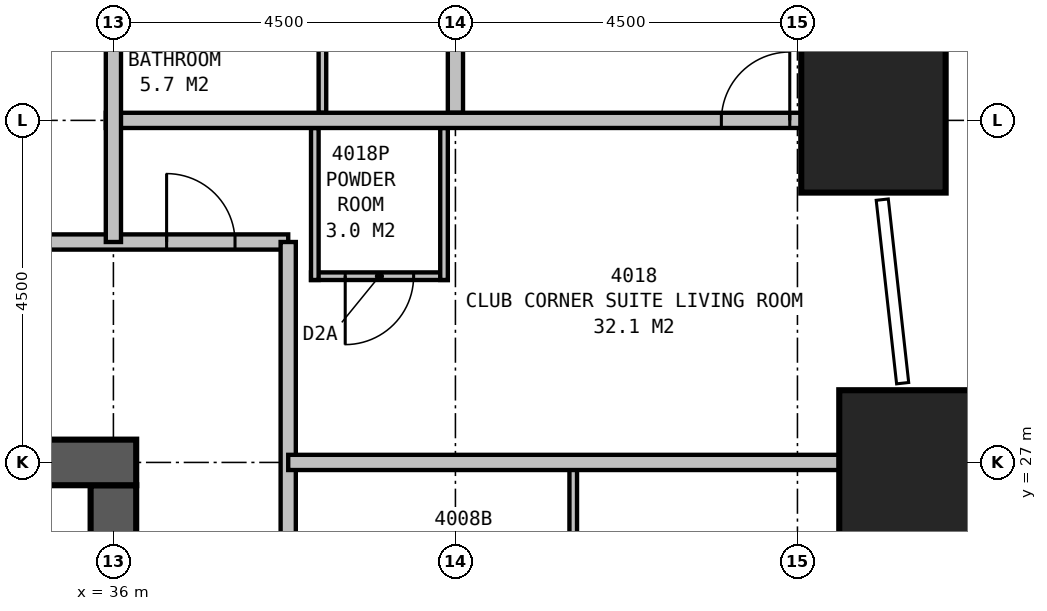
"""IFC4 building model, lengths in metres.
Left out: names, types, materials, properties, quantities, classifications, styles, units other than length and angle.
Written with IfcOpenShell. Run it as: python <this file> out.ifc"""

import sys

from ifc_helpers import new_model, si_unit, direction, frame, frame_2d, origin, origin_2d, place, context, subcontext, project, spatial, rectangle, extrude, element, fill, save


model = new_model("IFC4")
c1 = context("Model", 3, precision=1e-05, world=origin(), true_north=direction((0.0, 1.0)))
c2 = subcontext(c1, "Body", "Model", "MODEL_VIEW")
j1 = project(units=[si_unit("LENGTHUNIT", "METRE"), si_unit("PLANEANGLEUNIT", "RADIAN")], contexts=[c1])
p1 = place(None, origin())
s1 = spatial("IfcSite", under=j1, at=p1, CompositionType="ELEMENT")
p2 = place(p1, origin())
s2 = spatial("IfcBuilding", under=s1, at=p2, CompositionType="ELEMENT")
p3 = place(p2, frame((0.0, 0.0, 157.9)))
s3 = spatial("IfcBuildingStorey", under=s2, at=p3, CompositionType="ELEMENT", Elevation=157.9)
for number, where, z_axis, x_axis in (
    (1, (46.5, 27.0, 0.0), (0.0, 0.0, 1.0), (1.0, 0.0, 0.0)),
    (2, (46.0, 31.5, 0.0), (0.0, 0.0, 1.0), (1.0, 0.0, 0.0)),
):
    element("IfcColumn", number, at=place(p3, frame(where, z_axis=z_axis, x_axis=x_axis)), inside=s3, PredefinedType="COLUMN", context=c2, shape_type="SweptSolid", body=[
        extrude(rectangle(XDim=1.9, YDim=1.9, at=origin_2d()), origin(), (0.0, 0.0, 1.0), 4.5),
    ])
p4 = place(p3, frame((36.3, 27.0, 0.0), z_axis=(0.0, 0.0, 1.0), x_axis=(-1.0, 0.0, 0.0)))
e3 = element("IfcWall", 3, at=p4, inside=s3, PredefinedType="SHEAR", context=c2, shape_type="SweptSolid", body=[
    extrude(rectangle(XDim=23.1, YDim=0.6, at=frame_2d((11.55, 0.0))), origin(), (0.0, 0.0, 1.0), 4.5),
])
p5 = place(p4, frame((17.05, 0.0, 0.0)))
e4 = element("IfcOpeningElement", 4, at=p5, cuts=e3, PredefinedType="OPENING", context=c2, shape_type="SweptSolid", body=[
    extrude(rectangle(XDim=1.0, YDim=2.1, at=frame_2d((0.5, 1.05))), frame((0.0, 0.31, 0.0), z_axis=(0.0, -1.0, 0.0), x_axis=(1.0, 0.0, 0.0)), (0.0, 0.0, 1.0), 0.62),
])
p6 = place(p4, frame((12.05, 0.0, 0.0)))
e5 = element("IfcOpeningElement", 5, at=p6, cuts=e3, PredefinedType="OPENING", context=c2, shape_type="SweptSolid", body=[
    extrude(rectangle(XDim=1.0, YDim=2.1, at=frame_2d((0.5, 1.05))), frame((0.0, 0.31, 0.0), z_axis=(0.0, -1.0, 0.0), x_axis=(1.0, 0.0, 0.0)), (0.0, 0.0, 1.0), 0.62),
])
p7 = place(p4, frame((7.05, 0.0, 0.0)))
e6 = element("IfcOpeningElement", 6, at=p7, cuts=e3, PredefinedType="OPENING", context=c2, shape_type="SweptSolid", body=[
    extrude(rectangle(XDim=1.0, YDim=2.1, at=frame_2d((0.5, 1.05))), frame((0.0, 0.31, 0.0), z_axis=(0.0, -1.0, 0.0), x_axis=(1.0, 0.0, 0.0)), (0.0, 0.0, 1.0), 0.62),
])
p8 = place(p3, frame((36.0, 20.0, 0.0), z_axis=(0.0, 0.0, 1.0), x_axis=(0.0, 1.0, 0.0)))
e7 = element("IfcWall", 7, at=p8, inside=s3, PredefinedType="SHEAR", context=c2, shape_type="SweptSolid", body=[
    extrude(rectangle(XDim=6.7, YDim=0.6, at=frame_2d((3.35, 0.0))), origin(), (0.0, 0.0, 1.0), 4.5),
])
p9 = place(p3, frame((11.2, 29.9, 0.0), z_axis=(0.0, 0.0, 1.0), x_axis=(1.0, 0.0, 0.0)))
e8 = element("IfcWall", 8, at=p9, inside=s3, PredefinedType="PARTITIONING", context=c2, shape_type="SweptSolid", body=[
    extrude(rectangle(XDim=27.1, YDim=0.2, at=frame_2d((13.55, 0.0))), origin(), (0.0, 0.0, 1.0), 4.25),
])
p10 = place(p9, frame((6.45, 0.0, 0.0), z_axis=(0.0, 0.0, 1.0), x_axis=(-1.0, 0.0, 0.0)))
e9 = element("IfcOpeningElement", 9, at=p10, cuts=e8, PredefinedType="OPENING", context=c2, shape_type="SweptSolid", body=[
    extrude(rectangle(XDim=1.0, YDim=2.1, at=frame_2d((0.5, 1.05))), frame((0.0, 0.11, 0.0), z_axis=(0.0, -1.0, 0.0), x_axis=(1.0, 0.0, 0.0)), (0.0, 0.0, 1.0), 0.22),
])
p11 = place(p9, frame((25.5, 0.0, 0.0)))
e10 = element("IfcOpeningElement", 10, at=p11, cuts=e8, PredefinedType="OPENING", context=c2, shape_type="SweptSolid", body=[
    extrude(rectangle(XDim=0.9, YDim=2.1, at=frame_2d((0.45, 1.05))), frame((0.0, 0.11, 0.0), z_axis=(0.0, -1.0, 0.0), x_axis=(1.0, 0.0, 0.0)), (0.0, 0.0, 1.0), 0.22),
])
p12 = place(p9, frame((0.7, 0.0, 0.0)))
e11 = element("IfcOpeningElement", 11, at=p12, cuts=e8, PredefinedType="OPENING", context=c2, shape_type="SweptSolid", body=[
    extrude(rectangle(XDim=0.9, YDim=2.1, at=frame_2d((0.45, 1.05))), frame((0.0, 0.11, 0.0), z_axis=(0.0, -1.0, 0.0), x_axis=(1.0, 0.0, 0.0)), (0.0, 0.0, 1.0), 0.22),
])
p13 = place(p3, frame((38.3, 11.2, 0.0), z_axis=(0.0, 0.0, 1.0), x_axis=(0.0, 1.0, 0.0)))
e12 = element("IfcWall", 12, at=p13, inside=s3, PredefinedType="PARTITIONING", context=c2, shape_type="SweptSolid", body=[
    extrude(rectangle(XDim=18.7, YDim=0.2, at=frame_2d((9.35, 0.0))), origin(), (0.0, 0.0, 1.0), 4.25),
])
p14 = place(p13, frame((6.35, 0.0, 0.0), z_axis=(0.0, 0.0, 1.0), x_axis=(-1.0, 0.0, 0.0)))
e13 = element("IfcOpeningElement", 13, at=p14, cuts=e12, PredefinedType="OPENING", context=c2, shape_type="SweptSolid", body=[
    extrude(rectangle(XDim=0.9, YDim=2.1, at=frame_2d((0.45, 1.05))), frame((0.0, 0.11, 0.0), z_axis=(0.0, -1.0, 0.0), x_axis=(1.0, 0.0, 0.0)), (0.0, 0.0, 1.0), 0.22),
])
p15 = place(p13, frame((10.45, 0.0, 0.0), z_axis=(0.0, 0.0, 1.0), x_axis=(-1.0, 0.0, 0.0)))
e14 = element("IfcOpeningElement", 14, at=p15, cuts=e12, PredefinedType="OPENING", context=c2, shape_type="SweptSolid", body=[
    extrude(rectangle(XDim=0.9, YDim=2.1, at=frame_2d((0.45, 1.05))), frame((0.0, 0.11, 0.0), z_axis=(0.0, -1.0, 0.0), x_axis=(1.0, 0.0, 0.0)), (0.0, 0.0, 1.0), 0.22),
])
p16 = place(p3, frame((42.05, 24.2, 0.0), z_axis=(0.0, 0.0, 1.0), x_axis=(0.0, 1.0, 0.0)))
e15 = element("IfcWall", 15, at=p16, inside=s3, PredefinedType="PLUMBINGWALL", context=c2, shape_type="SweptSolid", body=[
    extrude(rectangle(XDim=2.8, YDim=0.1, at=frame_2d((1.4, 0.0))), origin(), (0.0, 0.0, 1.0), 4.25),
])
p17 = place(p3, frame((38.3, 27.0, 0.0), z_axis=(0.0, 0.0, 1.0), x_axis=(1.0, 0.0, 0.0)))
e16 = element("IfcWall", 16, at=p17, inside=s3, PredefinedType="PARTITIONING", context=c2, shape_type="SweptSolid", body=[
    extrude(rectangle(XDim=7.977, YDim=0.2, at=frame_2d((3.988, 0.0))), origin(), (0.0, 0.0, 1.0), 2.95),
])
p18 = place(p3, frame((36.0, 29.9, 0.0), z_axis=(0.0, 0.0, 1.0), x_axis=(0.0, 1.0, 0.0)))
e17 = element("IfcWall", 17, at=p18, inside=s3, PredefinedType="PARTITIONING", context=c2, shape_type="SweptSolid", body=[
    extrude(rectangle(XDim=10.6, YDim=0.2, at=frame_2d((5.3, 0.0))), origin(), (0.0, 0.0, 1.0), 3.25),
])
p19 = place(p3, frame((35.9, 31.5, 0.0), z_axis=(0.0, 0.0, 1.0), x_axis=(1.0, 0.0, 0.0)))
e18 = element("IfcWall", 18, at=p19, inside=s3, PredefinedType="PARTITIONING", context=c2, shape_type="SweptSolid", body=[
    extrude(rectangle(XDim=10.099, YDim=0.2, at=frame_2d((5.05, 0.0))), origin(), (0.0, 0.0, 1.0), 4.25),
])
p20 = place(p19, frame((8.099, 0.0, 0.0)))
e19 = element("IfcOpeningElement", 19, at=p20, cuts=e18, PredefinedType="OPENING", context=c2, shape_type="SweptSolid", body=[
    extrude(rectangle(XDim=0.9, YDim=2.1, at=frame_2d((0.45, 1.05))), frame((0.0, 0.11, 0.0), z_axis=(0.0, -1.0, 0.0), x_axis=(1.0, 0.0, 0.0)), (0.0, 0.0, 1.0), 0.22),
])
p21 = place(p3, frame((40.35, 31.4, 0.0), z_axis=(0.0, 0.0, 1.0), x_axis=(0.0, -1.0, 0.0)))
e20 = element("IfcWall", 20, at=p21, inside=s3, PredefinedType="PLUMBINGWALL", context=c2, shape_type="SweptSolid", body=[
    extrude(rectangle(XDim=2.0, YDim=0.1, at=frame_2d((1.0, 0.0))), origin(), (0.0, 0.0, 1.0), 3.25),
])
p22 = place(p3, frame((38.65, 31.4, 0.0), z_axis=(0.0, 0.0, 1.0), x_axis=(0.0, -1.0, 0.0)))
e21 = element("IfcWall", 21, at=p22, inside=s3, PredefinedType="PLUMBINGWALL", context=c2, shape_type="SweptSolid", body=[
    extrude(rectangle(XDim=2.0, YDim=0.1, at=frame_2d((1.0, 0.0))), origin(), (0.0, 0.0, 1.0), 4.25),
])
p23 = place(p3, frame((38.6, 29.45, 0.0), z_axis=(0.0, 0.0, 1.0), x_axis=(1.0, 0.0, 0.0)))
e22 = element("IfcWall", 22, at=p23, inside=s3, PredefinedType="PLUMBINGWALL", context=c2, shape_type="SweptSolid", body=[
    extrude(rectangle(XDim=1.8, YDim=0.1, at=frame_2d((0.9, 0.0))), origin(), (0.0, 0.0, 1.0), 4.25),
])
p24 = place(p23, frame((1.35, 0.0, 0.0), z_axis=(0.0, 0.0, 1.0), x_axis=(-1.0, 0.0, 0.0)))
e23 = element("IfcOpeningElement", 23, at=p24, cuts=e22, PredefinedType="OPENING", context=c2, shape_type="SweptSolid", body=[
    extrude(rectangle(XDim=0.9, YDim=2.1, at=frame_2d((0.45, 1.05))), frame((0.0, 0.06, 0.0), z_axis=(0.0, -1.0, 0.0), x_axis=(1.0, 0.0, 0.0)), (0.0, 0.0, 1.0), 0.12),
])
p25 = place(p3, frame((40.5, 31.6, 0.0), z_axis=(0.0, 0.0, 1.0), x_axis=(0.0, 1.0, 0.0)))
e24 = element("IfcWall", 24, at=p25, inside=s3, PredefinedType="PARTITIONING", context=c2, shape_type="SweptSolid", body=[
    extrude(rectangle(XDim=4.4, YDim=0.2, at=frame_2d((2.2, 0.0))), origin(), (0.0, 0.0, 1.0), 3.25),
])
p26 = place(p25, frame((2.4, 0.0, 0.0)))
e25 = element("IfcOpeningElement", 25, at=p26, cuts=e24, PredefinedType="OPENING", context=c2, shape_type="SweptSolid", body=[
    extrude(rectangle(XDim=0.9, YDim=2.1, at=frame_2d((0.45, 1.05))), frame((0.0, 0.11, 0.0), z_axis=(0.0, -1.0, 0.0), x_axis=(1.0, 0.0, 0.0)), (0.0, 0.0, 1.0), 0.22),
])
p27 = place(p3, frame((38.75, 31.6, 0.0), z_axis=(0.0, 0.0, 1.0), x_axis=(0.0, 1.0, 0.0)))
e26 = element("IfcWall", 26, at=p27, inside=s3, PredefinedType="PLUMBINGWALL", context=c2, shape_type="SweptSolid", body=[
    extrude(rectangle(XDim=2.3, YDim=0.1, at=frame_2d((1.15, 0.0))), origin(), (0.0, 0.0, 1.0), 4.25),
])
p28 = place(p11, origin())
e27 = element("IfcDoor", 27, at=p28, inside=s3, OperationType="SINGLE_SWING_LEFT", PredefinedType="DOOR", context=c2, shape_type="SweptSolid", body=[
    extrude(rectangle(XDim=0.9, YDim=2.1, at=frame_2d((0.45, 1.05))), frame((0.0, 0.025, 0.0), z_axis=(0.0, -1.0, 0.0), x_axis=(1.0, 0.0, 0.0)), (0.0, 0.0, 1.0), 0.05),
])
fill(e10, e27)
p29 = place(p20, origin())
e28 = element("IfcDoor", 28, at=p29, inside=s3, OperationType="SINGLE_SWING_RIGHT", PredefinedType="DOOR", context=c2, shape_type="SweptSolid", body=[
    extrude(rectangle(XDim=0.9, YDim=2.1, at=frame_2d((0.45, 1.05))), frame((0.0, 0.025, 0.0), z_axis=(0.0, -1.0, 0.0), x_axis=(1.0, 0.0, 0.0)), (0.0, 0.0, 1.0), 0.05),
])
fill(e19, e28)
p30 = place(p24, origin())
e29 = element("IfcDoor", 29, at=p30, inside=s3, OperationType="SINGLE_SWING_RIGHT", PredefinedType="DOOR", context=c2, shape_type="SweptSolid", body=[
    extrude(rectangle(XDim=0.9, YDim=2.1, at=frame_2d((0.45, 1.05))), frame((0.0, 0.025, 0.0), z_axis=(0.0, -1.0, 0.0), x_axis=(1.0, 0.0, 0.0)), (0.0, 0.0, 1.0), 0.05),
])
fill(e23, e29)
save(model, sys.argv[1])
